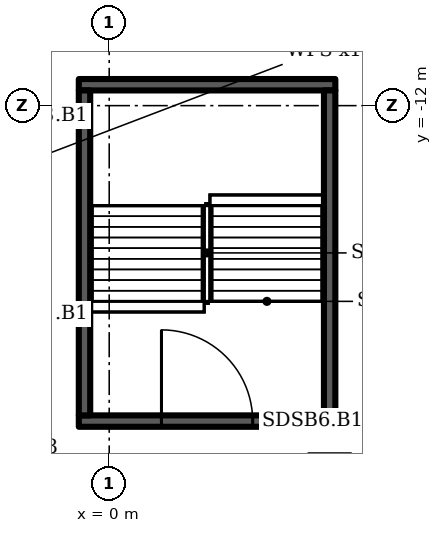
"""IFC4 building model, lengths in metres.
Left out: names, types, materials, properties, quantities, classifications, styles, units other than length and angle.
Written with IfcOpenShell. Run it as: python <this file> out.ifc"""

import sys

from ifc_helpers import new_model, si_unit, direction, frame, frame_2d, origin, place, context, subcontext, project, spatial, rectangle, extrude, element, fill, save


model = new_model("IFC4")
c1 = context("Model", 3, precision=1e-05, world=origin(), true_north=direction((0.0, 1.0)))
c2 = subcontext(c1, "Body", "Model", "MODEL_VIEW")
j1 = project(units=[si_unit("LENGTHUNIT", "METRE"), si_unit("PLANEANGLEUNIT", "RADIAN")], contexts=[c1])
p1 = place(None, origin())
s1 = spatial("IfcSite", under=j1, at=p1, CompositionType="ELEMENT")
p2 = place(p1, origin())
s2 = spatial("IfcBuilding", under=s1, at=p2, CompositionType="ELEMENT")
p3 = place(p2, frame((0.0, 0.0, -7.2)))
s3 = spatial("IfcBuildingStorey", under=s2, at=p3, CompositionType="ELEMENT", Elevation=-7.2)
p4 = place(p3, frame((-0.8, -20.3, 0.0), z_axis=(0.0, 0.0, 1.0), x_axis=(1.0, 0.0, 0.0)))
e1 = element("IfcWall", 1, at=p4, inside=s3, PredefinedType="SHEAR", context=c2, shape_type="SweptSolid", body=[
    extrude(rectangle(XDim=6.75, YDim=0.3, at=frame_2d((3.375, 0.0))), origin(), (0.0, 0.0, 1.0), 6.9),
])
p5 = place(p4, frame((2.175, 0.0, 0.0)))
e2 = element("IfcOpeningElement", 2, at=p5, cuts=e1, PredefinedType="OPENING", context=c2, shape_type="SweptSolid", body=[
    extrude(rectangle(XDim=2.4, YDim=2.1, at=frame_2d((1.2, 1.05))), frame((0.0, 0.16, 0.0), z_axis=(0.0, -1.0, 0.0), x_axis=(1.0, 0.0, 0.0)), (0.0, 0.0, 1.0), 0.32),
])
p6 = place(p3, frame((-0.8, -11.45, 0.0), z_axis=(0.0, 0.0, 1.0), x_axis=(1.0, 0.0, 0.0)))
e3 = element("IfcWall", 3, at=p6, inside=s3, PredefinedType="SHEAR", context=c2, shape_type="SweptSolid", body=[
    extrude(rectangle(XDim=6.75, YDim=0.3, at=frame_2d((3.375, 0.0))), origin(), (0.0, 0.0, 1.0), 6.9),
])
for number, where, z_axis, x_axis in (
    (4, (-0.65, -20.15, 0.0), (0.0, 0.0, 1.0), (0.0, 1.0, 0.0)),
    (5, (5.8, -20.15, 0.0), (0.0, 0.0, 1.0), (0.0, 1.0, 0.0)),
):
    element("IfcWall", number, at=place(p3, frame(where, z_axis=z_axis, x_axis=x_axis)), inside=s3, PredefinedType="SHEAR", context=c2, shape_type="SweptSolid", body=[
        extrude(rectangle(XDim=8.55, YDim=0.3, at=frame_2d((4.275, 0.0))), origin(), (0.0, 0.0, 1.0), 6.9),
    ])
p7 = place(p5, origin())
e6 = element("IfcDoor", 6, at=p7, inside=s3, OperationType="DOUBLE_DOOR_SINGLE_SWING", PredefinedType="DOOR", context=c2, shape_type="SweptSolid", body=[
    extrude(rectangle(XDim=2.4, YDim=2.1, at=frame_2d((1.2, 1.05))), frame((0.0, 0.025, 0.0), z_axis=(0.0, -1.0, 0.0), x_axis=(1.0, 0.0, 0.0)), (0.0, 0.0, 1.0), 0.05),
])
fill(e2, e6)
save(model, sys.argv[1])
